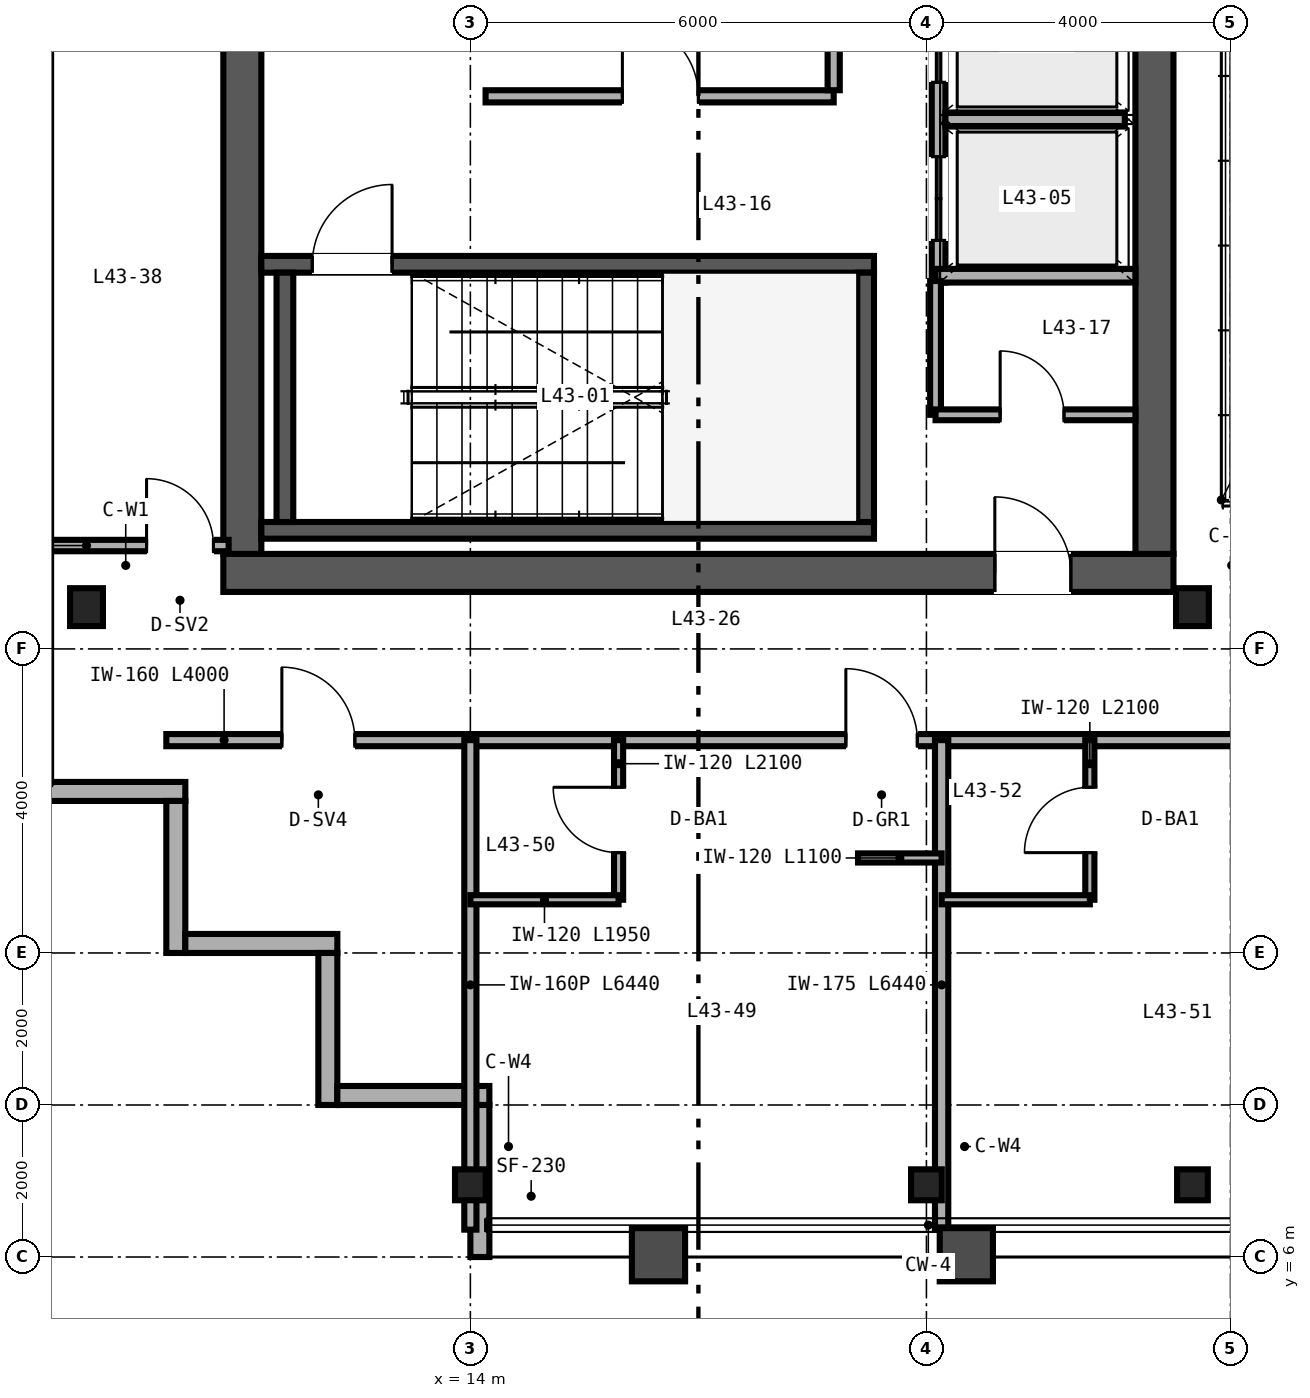
"""IFC4 building model, lengths in metres.
Left out: names, types, materials, properties, quantities, classifications, styles, units other than length and angle.
Written with IfcOpenShell. Run it as: python <this file> out.ifc"""

import sys

from ifc_helpers import new_model, si_unit, direction, frame, frame_2d, origin, origin_2d, place, context, subcontext, project, spatial, rectangle, i_section, extrude, source, transform, mapped, element, fill, save


model = new_model("IFC4")
c1 = context("Model", 3, precision=1e-05, world=origin(), true_north=direction((0.0, 1.0)))
c2 = subcontext(c1, "Body", "Model", "MODEL_VIEW")
j1 = project(units=[si_unit("LENGTHUNIT", "METRE"), si_unit("PLANEANGLEUNIT", "RADIAN")], contexts=[c1])
p1 = place(None, origin())
s1 = spatial("IfcSite", under=j1, at=p1, CompositionType="ELEMENT")
p2 = place(p1, origin())
s2 = spatial("IfcBuilding", under=s1, at=p2, CompositionType="ELEMENT")
p3 = place(p2, frame((0.0, 0.0, 174.0)))
s3 = spatial("IfcBuildingStorey", under=s2, at=p3, CompositionType="ELEMENT", Elevation=174.0)
p4 = place(p3, frame((10.75, 15.0, 0.0), z_axis=(0.0, 0.0, 1.0), x_axis=(1.0, 0.0, 0.0)))
e1 = element("IfcWall", 1, at=p4, inside=s3, PredefinedType="SHEAR", context=c2, shape_type="SweptSolid", body=[
    extrude(rectangle(XDim=12.5, YDim=0.5, at=frame_2d((6.25, 0.0))), origin(), (0.0, 0.0, 1.0), 3.37),
])
p5 = place(p4, frame((10.15, 0.0, 0.0)))
e2 = element("IfcOpeningElement", 2, at=p5, cuts=e1, PredefinedType="OPENING", context=c2, shape_type="SweptSolid", body=[
    extrude(rectangle(XDim=1.0, YDim=2.15, at=frame_2d((0.5, 1.075))), frame((0.0, 0.26, 0.0), z_axis=(0.0, -1.0, 0.0), x_axis=(1.0, 0.0, 0.0)), (0.0, 0.0, 1.0), 0.52),
])
for number, where, z_axis, x_axis in (
    (3, (11.0, 15.25, 0.0), (0.0, 0.0, 1.0), (0.0, 1.0, 0.0)),
    (4, (23.0, 15.25, 0.0), (0.0, 0.0, 1.0), (0.0, 1.0, 0.0)),
):
    element("IfcWall", number, at=place(p3, frame(where, z_axis=z_axis, x_axis=x_axis)), inside=s3, PredefinedType="SHEAR", context=c2, shape_type="SweptSolid", body=[
        extrude(rectangle(XDim=21.5, YDim=0.5, at=frame_2d((10.75, 0.0))), origin(), (0.0, 0.0, 1.0), 3.37),
    ])
p6 = place(p3, frame((11.25, 15.56, 0.0), z_axis=(0.0, 0.0, 1.0), x_axis=(1.0, 0.0, 0.0)))
e5 = element("IfcWall", 5, at=p6, inside=s3, PredefinedType="SHEAR", context=c2, shape_type="SweptSolid", body=[
    extrude(rectangle(XDim=8.06, YDim=0.22, at=frame_2d((4.03, 0.0))), origin(), (0.0, 0.0, 1.0), 3.4),
])
p7 = place(p3, frame((11.25, 19.06, 0.0), z_axis=(0.0, 0.0, 1.0), x_axis=(1.0, 0.0, 0.0)))
e6 = element("IfcWall", 6, at=p7, inside=s3, PredefinedType="SHEAR", context=c2, shape_type="SweptSolid", body=[
    extrude(rectangle(XDim=8.06, YDim=0.22, at=frame_2d((4.03, 0.0))), origin(), (0.0, 0.0, 1.0), 3.4),
])
p8 = place(p7, frame((0.67, 0.0, 0.0)))
e7 = element("IfcOpeningElement", 7, at=p8, cuts=e6, PredefinedType="OPENING", context=c2, shape_type="SweptSolid", body=[
    extrude(rectangle(XDim=1.05, YDim=2.15, at=frame_2d((0.525, 1.075))), frame((0.0, 0.12, 0.0), z_axis=(0.0, -1.0, 0.0), x_axis=(1.0, 0.0, 0.0)), (0.0, 0.0, 1.0), 0.24),
])
for number, where, z_axis, x_axis in (
    (8, (11.56, 15.67, 0.0), (0.0, 0.0, 1.0), (0.0, 1.0, 0.0)),
    (9, (19.2, 15.67, 0.0), (0.0, 0.0, 1.0), (0.0, 1.0, 0.0)),
):
    element("IfcWall", number, at=place(p3, frame(where, z_axis=z_axis, x_axis=x_axis)), inside=s3, PredefinedType="SHEAR", context=c2, shape_type="SweptSolid", body=[
        extrude(rectangle(XDim=3.28, YDim=0.22, at=frame_2d((1.64, 0.0))), origin(), (0.0, 0.0, 1.0), 3.4),
    ])
m1 = source(origin(), c2, "Body", "SweptSolid", [
    extrude(i_section(OverallWidth=0.432, OverallDepth=0.498, WebThickness=0.056, FlangeThickness=0.089, FilletRadius=0.025, at=origin_2d()), origin(), (0.0, 0.0, 1.0), 3.37),
])
for number, where, z_axis, x_axis in (
    (10, (8.95, 14.55, 0.0), (0.0, 0.0, 1.0), (1.0, 0.0, 0.0)),
    (11, (23.5, 14.55, 0.0), (0.0, 0.0, 1.0), (1.0, 0.0, 0.0)),
):
    element("IfcColumn", number, at=place(p3, frame(where, z_axis=z_axis, x_axis=x_axis)), inside=s3, PredefinedType="COLUMN", context=c2, shape_type="MappedRepresentation", body=[
        mapped(m1, transform((0.0, 0.0, 0.0), scale=1.0)),
    ])
m2 = source(origin(), c2, "Body", "SweptSolid", [
    extrude(i_section(OverallWidth=0.404, OverallDepth=0.407, WebThickness=0.027, FlangeThickness=0.044, FilletRadius=0.025, at=origin_2d()), origin(), (0.0, 0.0, 1.0), 3.37),
])
for number, where, z_axis, x_axis in (
    (12, (14.0, 6.95, 0.0), (0.0, 0.0, 1.0), (1.0, 0.0, 0.0)),
    (13, (20.0, 6.95, 0.0), (0.0, 0.0, 1.0), (1.0, 0.0, 0.0)),
    (14, (23.5, 6.95, 0.0), (0.0, 0.0, 1.0), (1.0, 0.0, 0.0)),
):
    element("IfcColumn", number, at=place(p3, frame(where, z_axis=z_axis, x_axis=x_axis)), inside=s3, PredefinedType="COLUMN", context=c2, shape_type="MappedRepresentation", body=[
        mapped(m2, transform((0.0, 0.0, 0.0), scale=1.0)),
    ])
p9 = place(p3, frame((8.0, 12.125, 0.0), z_axis=(0.0, 0.0, 1.0), x_axis=(1.0, 0.0, 0.0)))
e15 = element("IfcWall", 15, at=p9, inside=s3, PredefinedType="SOLIDWALL", context=c2, shape_type="SweptSolid", body=[
    extrude(rectangle(XDim=2.25, YDim=0.25, at=frame_2d((1.125, 0.0))), origin(), (0.0, 0.0, 1.0), 3.37),
])
for number, where, z_axis, x_axis in (
    (16, (10.125, 12.0, 0.0), (0.0, 0.0, 1.0), (0.0, -1.0, 0.0)),
    (17, (10.25, 10.125, 0.0), (0.0, 0.0, 1.0), (1.0, 0.0, 0.0)),
    (18, (12.125, 10.0, 0.0), (0.0, 0.0, 1.0), (0.0, -1.0, 0.0)),
    (19, (12.25, 8.125, 0.0), (0.0, 0.0, 1.0), (1.0, 0.0, 0.0)),
):
    element("IfcWall", number, at=place(p3, frame(where, z_axis=z_axis, x_axis=x_axis)), inside=s3, PredefinedType="SOLIDWALL", context=c2, shape_type="SweptSolid", body=[
        extrude(rectangle(XDim=2.0, YDim=0.25, at=frame_2d((1.0, 0.0))), origin(), (0.0, 0.0, 1.0), 3.37),
    ])
p10 = place(p3, frame((14.125, 8.0, 0.0), z_axis=(0.0, 0.0, 1.0), x_axis=(0.0, -1.0, 0.0)))
e20 = element("IfcWall", 20, at=p10, inside=s3, PredefinedType="SOLIDWALL", context=c2, shape_type="SweptSolid", body=[
    extrude(rectangle(XDim=2.0, YDim=0.25, at=frame_2d((1.0, 0.0))), origin(), (0.0, 0.0, 1.0), 2.677),
])
p11 = place(p3, frame((20.16, 18.82, 0.0), z_axis=(0.0, 0.0, 1.0), x_axis=(0.0, 1.0, 0.0)))
e21 = element("IfcWall", 21, at=p11, inside=s3, PredefinedType="SOLIDWALL", context=c2, shape_type="SweptSolid", body=[
    extrude(rectangle(XDim=6.32, YDim=0.18, at=frame_2d((3.16, 0.0))), origin(), (0.0, 0.0, 1.0), 2.47),
])
p12 = place(p11, frame((0.555, 0.0, 0.0)))
e22 = element("IfcOpeningElement", 22, at=p12, cuts=e21, PredefinedType="OPENING", context=c2, shape_type="SweptSolid", body=[
    extrude(rectangle(XDim=1.1, YDim=2.2, at=frame_2d((0.55, 1.1))), frame((0.0, 0.1, 0.0), z_axis=(0.0, -1.0, 0.0), x_axis=(1.0, 0.0, 0.0)), (0.0, 0.0, 1.0), 0.2),
])
p13 = place(p11, frame((2.635, 0.0, 0.0)))
e23 = element("IfcOpeningElement", 23, at=p13, cuts=e21, PredefinedType="OPENING", context=c2, shape_type="SweptSolid", body=[
    extrude(rectangle(XDim=1.1, YDim=2.2, at=frame_2d((0.55, 1.1))), frame((0.0, 0.1, 0.0), z_axis=(0.0, -1.0, 0.0), x_axis=(1.0, 0.0, 0.0)), (0.0, 0.0, 1.0), 0.2),
])
p14 = place(p11, frame((4.69, 0.0, 0.0)))
e24 = element("IfcOpeningElement", 24, at=p14, cuts=e21, PredefinedType="OPENING", context=c2, shape_type="SweptSolid", body=[
    extrude(rectangle(XDim=1.1, YDim=2.2, at=frame_2d((0.55, 1.1))), frame((0.0, 0.1, 0.0), z_axis=(0.0, -1.0, 0.0), x_axis=(1.0, 0.0, 0.0)), (0.0, 0.0, 1.0), 0.2),
])
p15 = place(p3, frame((20.12, 18.91, 0.0), z_axis=(0.0, 0.0, 1.0), x_axis=(1.0, 0.0, 0.0)))
e25 = element("IfcWall", 25, at=p15, inside=s3, PredefinedType="SOLIDWALL", context=c2, shape_type="SweptSolid", body=[
    extrude(rectangle(XDim=2.63, YDim=0.18, at=frame_2d((1.315, 0.0))), origin(), (0.0, 0.0, 1.0), 3.37),
])
p16 = place(p3, frame((20.25, 20.965, 0.0), z_axis=(0.0, 0.0, 1.0), x_axis=(1.0, 0.0, 0.0)))
e26 = element("IfcWall", 26, at=p16, inside=s3, PredefinedType="SOLIDWALL", context=c2, shape_type="SweptSolid", body=[
    extrude(rectangle(XDim=2.36, YDim=0.18, at=frame_2d((1.18, 0.0))), origin(), (0.0, 0.0, 1.0), 2.47),
])
p17 = place(p3, frame((14.2, 21.27, 0.0), z_axis=(0.0, 0.0, 1.0), x_axis=(1.0, 0.0, 0.0)))
e27 = element("IfcWall", 27, at=p17, inside=s3, PredefinedType="PARTITIONING", context=c2, shape_type="SweptSolid", body=[
    extrude(rectangle(XDim=4.58, YDim=0.16, at=frame_2d((2.29, 0.0))), origin(), (0.0, 0.0, 1.0), 3.37),
])
p18 = place(p17, frame((1.8, 0.0, 0.0)))
e28 = element("IfcOpeningElement", 28, at=p18, cuts=e27, PredefinedType="OPENING", context=c2, shape_type="SweptSolid", body=[
    extrude(rectangle(XDim=1.0, YDim=2.15, at=frame_2d((0.5, 1.075))), frame((0.0, 0.09, 0.0), z_axis=(0.0, -1.0, 0.0), x_axis=(1.0, 0.0, 0.0)), (0.0, 0.0, 1.0), 0.18),
])
p19 = place(p3, frame((18.78, 21.35, 0.0), z_axis=(0.0, 0.0, 1.0), x_axis=(0.0, 1.0, 0.0)))
e29 = element("IfcWall", 29, at=p19, inside=s3, PredefinedType="PARTITIONING", context=c2, shape_type="SweptSolid", body=[
    extrude(rectangle(XDim=3.81, YDim=0.16, at=frame_2d((1.905, 0.0))), origin(), (0.0, 0.0, 1.0), 3.37),
])
p20 = place(p3, frame((20.12, 17.08, 0.0), z_axis=(0.0, 0.0, 1.0), x_axis=(0.0, 1.0, 0.0)))
e30 = element("IfcWall", 30, at=p20, inside=s3, PredefinedType="PARTITIONING", context=c2, shape_type="SweptSolid", body=[
    extrude(rectangle(XDim=1.76, YDim=0.142, at=frame_2d((0.88, 0.0))), origin(), (0.0, 0.0, 1.0), 3.37),
])
p21 = place(p3, frame((20.12, 17.08, 0.0), z_axis=(0.0, 0.0, 1.0), x_axis=(1.0, 0.0, 0.0)))
e31 = element("IfcWall", 31, at=p21, inside=s3, PredefinedType="PARTITIONING", context=c2, shape_type="SweptSolid", body=[
    extrude(rectangle(XDim=2.63, YDim=0.142, at=frame_2d((1.315, 0.0))), origin(), (0.0, 0.0, 1.0), 3.37),
])
p22 = place(p21, frame((0.85, 0.0, 0.0)))
e32 = element("IfcOpeningElement", 32, at=p22, cuts=e31, PredefinedType="OPENING", context=c2, shape_type="SweptSolid", body=[
    extrude(rectangle(XDim=0.84, YDim=2.1, at=frame_2d((0.42, 1.05))), frame((0.0, 0.081, 0.0), z_axis=(0.0, -1.0, 0.0), x_axis=(1.0, 0.0, 0.0)), (0.0, 0.0, 1.0), 0.162),
])
p23 = place(p3, frame((8.16, 15.36, 0.0), z_axis=(0.0, 0.0, 1.0), x_axis=(1.0, 0.0, 0.0)))
e33 = element("IfcWall", 33, at=p23, inside=s3, PredefinedType="PARTITIONING", context=c2, shape_type="SweptSolid", body=[
    extrude(rectangle(XDim=2.66, YDim=0.15, at=frame_2d((1.33, 0.0))), origin(), (0.0, 0.0, 1.0), 2.591),
])
p24 = place(p23, frame((1.58, 0.0, 0.0)))
e34 = element("IfcOpeningElement", 34, at=p24, cuts=e33, PredefinedType="OPENING", context=c2, shape_type="SweptSolid", body=[
    extrude(rectangle(XDim=0.88, YDim=2.15, at=frame_2d((0.44, 1.075))), frame((0.0, 0.085, 0.0), z_axis=(0.0, -1.0, 0.0), x_axis=(1.0, 0.0, 0.0)), (0.0, 0.0, 1.0), 0.17),
])
p25 = place(p3, frame((10.0, 12.8, 0.0), z_axis=(0.0, 0.0, 1.0), x_axis=(1.0, 0.0, 0.0)))
e35 = element("IfcWall", 35, at=p25, inside=s3, PredefinedType="PARTITIONING", context=c2, shape_type="SweptSolid", body=[
    extrude(rectangle(XDim=4.0, YDim=0.16, at=frame_2d((2.0, 0.0))), origin(), (0.0, 0.0, 1.0), 3.37),
])
p26 = place(p25, frame((1.52, 0.0, 0.0)))
e36 = element("IfcOpeningElement", 36, at=p26, cuts=e35, PredefinedType="OPENING", context=c2, shape_type="SweptSolid", body=[
    extrude(rectangle(XDim=0.96, YDim=2.15, at=frame_2d((0.48, 1.075))), frame((0.0, 0.09, 0.0), z_axis=(0.0, -1.0, 0.0), x_axis=(1.0, 0.0, 0.0)), (0.0, 0.0, 1.0), 0.18),
])
p27 = place(p3, frame((14.0, 12.8, 0.0), z_axis=(0.0, 0.0, 1.0), x_axis=(1.0, 0.0, 0.0)))
e37 = element("IfcWall", 37, at=p27, inside=s3, PredefinedType="PARTITIONING", context=c2, shape_type="SweptSolid", body=[
    extrude(rectangle(XDim=12.0, YDim=0.16, at=frame_2d((6.0, 0.0))), origin(), (0.0, 0.0, 1.0), 2.913),
])
p28 = place(p27, frame((4.94, 0.0, 0.0)))
e38 = element("IfcOpeningElement", 38, at=p28, cuts=e37, PredefinedType="OPENING", context=c2, shape_type="SweptSolid", body=[
    extrude(rectangle(XDim=0.94, YDim=2.15, at=frame_2d((0.47, 1.075))), frame((0.0, 0.09, 0.0), z_axis=(0.0, -1.0, 0.0), x_axis=(1.0, 0.0, 0.0)), (0.0, 0.0, 1.0), 0.18),
])
p29 = place(p27, frame((10.74, 0.0, 0.0)))
e39 = element("IfcOpeningElement", 39, at=p29, cuts=e37, PredefinedType="OPENING", context=c2, shape_type="SweptSolid", body=[
    extrude(rectangle(XDim=0.94, YDim=2.15, at=frame_2d((0.47, 1.075))), frame((0.0, 0.09, 0.0), z_axis=(0.0, -1.0, 0.0), x_axis=(1.0, 0.0, 0.0)), (0.0, 0.0, 1.0), 0.18),
])
p30 = place(p3, frame((14.0, 6.36, 0.0), z_axis=(0.0, 0.0, 1.0), x_axis=(0.0, 1.0, 0.0)))
e40 = element("IfcWall", 40, at=p30, inside=s3, PredefinedType="PARTITIONING", context=c2, shape_type="SweptSolid", body=[
    extrude(rectangle(XDim=6.44, YDim=0.16, at=frame_2d((3.22, 0.0))), origin(), (0.0, 0.0, 1.0), 2.677),
])
p31 = place(p3, frame((20.2, 6.36, 0.0), z_axis=(0.0, 0.0, 1.0), x_axis=(0.0, 1.0, 0.0)))
e41 = element("IfcWall", 41, at=p31, inside=s3, PredefinedType="PARTITIONING", context=c2, shape_type="SweptSolid", body=[
    extrude(rectangle(XDim=6.44, YDim=0.175, at=frame_2d((3.22, 0.0))), origin(), (0.0, 0.0, 1.0), 2.677),
])
p32 = place(p3, frame((15.95, 10.7, 0.0), z_axis=(0.0, 0.0, 1.0), x_axis=(0.0, 1.0, 0.0)))
e42 = element("IfcWall", 42, at=p32, inside=s3, PredefinedType="PARTITIONING", context=c2, shape_type="SweptSolid", body=[
    extrude(rectangle(XDim=2.1, YDim=0.12, at=frame_2d((1.05, 0.0))), origin(), (0.0, 0.0, 1.0), 3.37),
])
p33 = place(p32, frame((0.62, 0.0, 0.0)))
e43 = element("IfcOpeningElement", 43, at=p33, cuts=e42, PredefinedType="OPENING", context=c2, shape_type="SweptSolid", body=[
    extrude(rectangle(XDim=0.86, YDim=2.1, at=frame_2d((0.43, 1.05))), frame((0.0, 0.07, 0.0), z_axis=(0.0, -1.0, 0.0), x_axis=(1.0, 0.0, 0.0)), (0.0, 0.0, 1.0), 0.14),
])
p34 = place(p3, frame((14.0, 10.7, 0.0), z_axis=(0.0, 0.0, 1.0), x_axis=(1.0, 0.0, 0.0)))
e44 = element("IfcWall", 44, at=p34, inside=s3, PredefinedType="PARTITIONING", context=c2, shape_type="SweptSolid", body=[
    extrude(rectangle(XDim=1.95, YDim=0.12, at=frame_2d((0.975, 0.0))), origin(), (0.0, 0.0, 1.0), 3.37),
])
p35 = place(p3, frame((19.1, 11.25, 0.0), z_axis=(0.0, 0.0, 1.0), x_axis=(1.0, 0.0, 0.0)))
e45 = element("IfcWall", 45, at=p35, inside=s3, PredefinedType="PARTITIONING", context=c2, shape_type="SweptSolid", body=[
    extrude(rectangle(XDim=1.1, YDim=0.12, at=frame_2d((0.55, 0.0))), origin(), (0.0, 0.0, 1.0), 3.37),
])
p36 = place(p3, frame((22.15, 10.7, 0.0), z_axis=(0.0, 0.0, 1.0), x_axis=(0.0, 1.0, 0.0)))
e46 = element("IfcWall", 46, at=p36, inside=s3, PredefinedType="PARTITIONING", context=c2, shape_type="SweptSolid", body=[
    extrude(rectangle(XDim=2.1, YDim=0.12, at=frame_2d((1.05, 0.0))), origin(), (0.0, 0.0, 1.0), 3.37),
])
p37 = place(p36, frame((0.62, 0.0, 0.0)))
e47 = element("IfcOpeningElement", 47, at=p37, cuts=e46, PredefinedType="OPENING", context=c2, shape_type="SweptSolid", body=[
    extrude(rectangle(XDim=0.86, YDim=2.1, at=frame_2d((0.43, 1.05))), frame((0.0, 0.07, 0.0), z_axis=(0.0, -1.0, 0.0), x_axis=(1.0, 0.0, 0.0)), (0.0, 0.0, 1.0), 0.14),
])
p38 = place(p3, frame((20.2, 10.7, 0.0), z_axis=(0.0, 0.0, 1.0), x_axis=(1.0, 0.0, 0.0)))
e48 = element("IfcWall", 48, at=p38, inside=s3, PredefinedType="PARTITIONING", context=c2, shape_type="SweptSolid", body=[
    extrude(rectangle(XDim=1.95, YDim=0.12, at=frame_2d((0.975, 0.0))), origin(), (0.0, 0.0, 1.0), 3.37),
])
m3 = source(origin(), c2, "Body", "SweptSolid", [
    extrude(rectangle(XDim=1.05, YDim=2.15, at=frame_2d((0.525, 1.075))), frame((0.0, 0.025, 0.0), z_axis=(0.0, -1.0, 0.0), x_axis=(1.0, 0.0, 0.0)), (0.0, 0.0, 1.0), 0.05),
])
p39 = place(p8, origin())
e49 = element("IfcDoor", 49, at=p39, inside=s3, OperationType="SINGLE_SWING_RIGHT", PredefinedType="DOOR", context=c2, shape_type="MappedRepresentation", body=[
    mapped(m3, transform((0.0, 0.0, 0.0), scale=1.0)),
])
fill(e7, e49)
m4 = source(origin(), c2, "Body", "SweptSolid", [
    extrude(rectangle(XDim=1.1, YDim=2.2, at=frame_2d((0.55, 1.1))), frame((0.0, 0.025, 0.0), z_axis=(0.0, -1.0, 0.0), x_axis=(1.0, 0.0, 0.0)), (0.0, 0.0, 1.0), 0.05),
])
p40 = place(p12, origin())
e50 = element("IfcDoor", 50, at=p40, inside=s3, OperationType="DOUBLE_DOOR_SLIDING", PredefinedType="DOOR", context=c2, shape_type="MappedRepresentation", body=[
    mapped(m4, transform((0.0, 0.0, 0.0), scale=1.0)),
])
fill(e22, e50)
p41 = place(p13, origin())
e51 = element("IfcDoor", 51, at=p41, inside=s3, OperationType="DOUBLE_DOOR_SLIDING", PredefinedType="DOOR", context=c2, shape_type="MappedRepresentation", body=[
    mapped(m4, transform((0.0, 0.0, 0.0), scale=1.0)),
])
fill(e23, e51)
m5 = source(origin(), c2, "Body", "SweptSolid", [
    extrude(rectangle(XDim=1.0, YDim=2.15, at=frame_2d((0.5, 1.075))), frame((0.0, 0.025, 0.0), z_axis=(0.0, -1.0, 0.0), x_axis=(1.0, 0.0, 0.0)), (0.0, 0.0, 1.0), 0.05),
])
p42 = place(p18, origin())
e52 = element("IfcDoor", 52, at=p42, inside=s3, OperationType="SINGLE_SWING_LEFT", PredefinedType="DOOR", context=c2, shape_type="MappedRepresentation", body=[
    mapped(m5, transform((0.0, 0.0, 0.0), scale=1.0)),
])
fill(e28, e52)
m6 = source(origin(), c2, "Body", "SweptSolid", [
    extrude(rectangle(XDim=0.84, YDim=2.1, at=frame_2d((0.42, 1.05))), frame((0.0, 0.025, 0.0), z_axis=(0.0, -1.0, 0.0), x_axis=(1.0, 0.0, 0.0)), (0.0, 0.0, 1.0), 0.05),
])
p43 = place(p22, origin())
e53 = element("IfcDoor", 53, at=p43, inside=s3, OperationType="SINGLE_SWING_LEFT", PredefinedType="DOOR", context=c2, shape_type="MappedRepresentation", body=[
    mapped(m6, transform((0.0, 0.0, 0.0), scale=1.0)),
])
fill(e32, e53)
p44 = place(p5, origin())
e54 = element("IfcDoor", 54, at=p44, inside=s3, OperationType="SINGLE_SWING_LEFT", PredefinedType="DOOR", context=c2, shape_type="MappedRepresentation", body=[
    mapped(m5, transform((0.0, 0.0, 0.0), scale=1.0)),
])
fill(e2, e54)
m7 = source(origin(), c2, "Body", "SweptSolid", [
    extrude(rectangle(XDim=0.88, YDim=2.15, at=frame_2d((0.44, 1.075))), frame((0.0, 0.025, 0.0), z_axis=(0.0, -1.0, 0.0), x_axis=(1.0, 0.0, 0.0)), (0.0, 0.0, 1.0), 0.05),
])
p45 = place(p24, origin())
e55 = element("IfcDoor", 55, at=p45, inside=s3, OperationType="SINGLE_SWING_LEFT", PredefinedType="DOOR", context=c2, shape_type="MappedRepresentation", body=[
    mapped(m7, transform((0.0, 0.0, 0.0), scale=1.0)),
])
fill(e34, e55)
m8 = source(origin(), c2, "Body", "SweptSolid", [
    extrude(rectangle(XDim=0.96, YDim=2.15, at=frame_2d((0.48, 1.075))), frame((0.0, 0.025, 0.0), z_axis=(0.0, -1.0, 0.0), x_axis=(1.0, 0.0, 0.0)), (0.0, 0.0, 1.0), 0.05),
])
p46 = place(p26, origin())
e56 = element("IfcDoor", 56, at=p46, inside=s3, OperationType="SINGLE_SWING_LEFT", PredefinedType="DOOR", context=c2, shape_type="MappedRepresentation", body=[
    mapped(m8, transform((0.0, 0.0, 0.0), scale=1.0)),
])
fill(e36, e56)
m9 = source(origin(), c2, "Body", "SweptSolid", [
    extrude(rectangle(XDim=0.86, YDim=2.1, at=frame_2d((0.43, 1.05))), frame((0.0, 0.025, 0.0), z_axis=(0.0, -1.0, 0.0), x_axis=(1.0, 0.0, 0.0)), (0.0, 0.0, 1.0), 0.05),
])
p47 = place(p33, origin())
e57 = element("IfcDoor", 57, at=p47, inside=s3, OperationType="SINGLE_SWING_RIGHT", PredefinedType="DOOR", context=c2, shape_type="MappedRepresentation", body=[
    mapped(m9, transform((0.0, 0.0, 0.0), scale=1.0)),
])
fill(e43, e57)
p48 = place(p37, origin())
e58 = element("IfcDoor", 58, at=p48, inside=s3, OperationType="SINGLE_SWING_LEFT", PredefinedType="DOOR", context=c2, shape_type="MappedRepresentation", body=[
    mapped(m9, transform((0.0, 0.0, 0.0), scale=1.0)),
])
fill(e47, e58)
m10 = source(origin(), c2, "Body", "SweptSolid", [
    extrude(rectangle(XDim=0.94, YDim=2.15, at=frame_2d((0.47, 1.075))), frame((0.0, 0.025, 0.0), z_axis=(0.0, -1.0, 0.0), x_axis=(1.0, 0.0, 0.0)), (0.0, 0.0, 1.0), 0.05),
])
p49 = place(p28, origin())
e59 = element("IfcDoor", 59, at=p49, inside=s3, OperationType="SINGLE_SWING_LEFT", PredefinedType="DOOR", context=c2, shape_type="MappedRepresentation", body=[
    mapped(m10, transform((0.0, 0.0, 0.0), scale=1.0)),
])
fill(e38, e59)
save(model, sys.argv[1])
